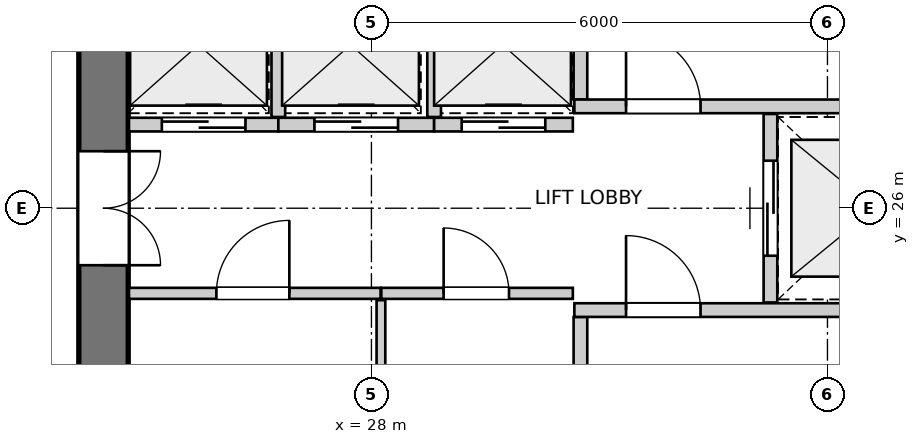
"""IFC4 building model, lengths in metres.
Left out: names, types, materials, properties, quantities, classifications, styles, units other than length and angle.
Written with IfcOpenShell. Run it as: python <this file> out.ifc"""

import sys

from ifc_helpers import new_model, si_unit, direction, frame, frame_2d, origin, place, context, subcontext, project, spatial, rectangle, extrude, source, transform, mapped, element, fill, save


model = new_model("IFC4")
c1 = context("Model", 3, precision=1e-05, world=origin(), true_north=direction((0.0, 1.0)))
c2 = subcontext(c1, "Body", "Model", "MODEL_VIEW")
j1 = project(units=[si_unit("LENGTHUNIT", "METRE"), si_unit("PLANEANGLEUNIT", "RADIAN")], contexts=[c1])
p1 = place(None, origin())
s1 = spatial("IfcSite", under=j1, at=p1, CompositionType="ELEMENT")
p2 = place(p1, origin())
s2 = spatial("IfcBuilding", under=s1, at=p2, CompositionType="ELEMENT")
p3 = place(p2, frame((0.0, 0.0, 181.0)))
s3 = spatial("IfcBuildingStorey", under=s2, at=p3, CompositionType="ELEMENT", Elevation=181.0)
p4 = place(p3, frame((24.475, 33.8, 0.0), z_axis=(0.0, 0.0, 1.0), x_axis=(0.0, -1.0, 0.0)))
e1 = element("IfcWall", 1, at=p4, inside=s3, PredefinedType="SHEAR", context=c2, shape_type="SweptSolid", body=[
    extrude(rectangle(XDim=15.6, YDim=0.65, at=frame_2d((7.8, 0.0))), origin(), (0.0, 0.0, 1.0), 2.95),
])
p5 = place(p4, frame((7.05, 0.0, 0.0)))
e2 = element("IfcOpeningElement", 2, at=p5, cuts=e1, PredefinedType="OPENING", context=c2, shape_type="SweptSolid", body=[
    extrude(rectangle(XDim=1.5, YDim=2.15, at=frame_2d((0.75, 1.075))), frame((0.0, 0.335, 0.0), z_axis=(0.0, -1.0, 0.0), x_axis=(1.0, 0.0, 0.0)), (0.0, 0.0, 1.0), 0.67),
])
p6 = place(p4, frame((3.52, 0.0, 0.0)))
e3 = element("IfcOpeningElement", 3, at=p6, cuts=e1, PredefinedType="OPENING", context=c2, shape_type="SweptSolid", body=[
    extrude(rectangle(XDim=0.86, YDim=2.05, at=frame_2d((0.43, 1.025))), frame((0.0, 0.335, 0.0), z_axis=(0.0, -1.0, 0.0), x_axis=(1.0, 0.0, 0.0)), (0.0, 0.0, 1.0), 0.67),
])
p7 = place(p4, frame((11.22, 0.0, 0.0)))
e4 = element("IfcOpeningElement", 4, at=p7, cuts=e1, PredefinedType="OPENING", context=c2, shape_type="SweptSolid", body=[
    extrude(rectangle(XDim=0.86, YDim=2.05, at=frame_2d((0.43, 1.025))), frame((0.0, 0.335, 0.0), z_axis=(0.0, -1.0, 0.0), x_axis=(1.0, 0.0, 0.0)), (0.0, 0.0, 1.0), 0.67),
])
p8 = place(p3, frame((30.75, 21.46, 0.0), z_axis=(0.0, 0.0, 1.0), x_axis=(0.0, 1.0, 0.0)))
e5 = element("IfcWall", 5, at=p8, inside=s3, PredefinedType="PARTITIONING", context=c2, shape_type="SweptSolid", body=[
    extrude(rectangle(XDim=3.11, YDim=0.18, at=frame_2d((1.555, 0.0))), origin(), (0.0, 0.0, 1.0), 2.95),
])
p9 = place(p8, frame((0.26, 0.0, 0.0)))
e6 = element("IfcOpeningElement", 6, at=p9, cuts=e5, PredefinedType="OPENING", context=c2, shape_type="SweptSolid", body=[
    extrude(rectangle(XDim=0.86, YDim=2.05, at=frame_2d((0.43, 1.025))), frame((0.0, 0.1, 0.0), z_axis=(0.0, -1.0, 0.0), x_axis=(1.0, 0.0, 0.0)), (0.0, 0.0, 1.0), 0.2),
])
p10 = place(p3, frame((30.67, 24.66, 0.0), z_axis=(0.0, 0.0, 1.0), x_axis=(1.0, 0.0, 0.0)))
e7 = element("IfcWall", 7, at=p10, inside=s3, PredefinedType="PARTITIONING", context=c2, shape_type="SweptSolid", body=[
    extrude(rectangle(XDim=5.22, YDim=0.18, at=frame_2d((2.61, 0.0))), origin(), (0.0, 0.0, 1.0), 2.95),
])
p11 = place(p10, frame((0.68, 0.0, 0.0)))
e8 = element("IfcOpeningElement", 8, at=p11, cuts=e7, PredefinedType="OPENING", context=c2, shape_type="SweptSolid", body=[
    extrude(rectangle(XDim=0.98, YDim=2.15, at=frame_2d((0.49, 1.075))), frame((0.0, 0.1, 0.0), z_axis=(0.0, -1.0, 0.0), x_axis=(1.0, 0.0, 0.0)), (0.0, 0.0, 1.0), 0.2),
])
p12 = place(p3, frame((30.75, 27.43, 0.0), z_axis=(0.0, 0.0, 1.0), x_axis=(0.0, 1.0, 0.0)))
e9 = element("IfcWall", 9, at=p12, inside=s3, PredefinedType="PARTITIONING", context=c2, shape_type="SweptSolid", body=[
    extrude(rectangle(XDim=3.11, YDim=0.18, at=frame_2d((1.555, 0.0))), origin(), (0.0, 0.0, 1.0), 2.95),
])
p13 = place(p12, frame((1.98, 0.0, 0.0)))
e10 = element("IfcOpeningElement", 10, at=p13, cuts=e9, PredefinedType="OPENING", context=c2, shape_type="SweptSolid", body=[
    extrude(rectangle(XDim=0.86, YDim=2.05, at=frame_2d((0.43, 1.025))), frame((0.0, 0.1, 0.0), z_axis=(0.0, -1.0, 0.0), x_axis=(1.0, 0.0, 0.0)), (0.0, 0.0, 1.0), 0.2),
])
p14 = place(p3, frame((30.67, 27.34, 0.0), z_axis=(0.0, 0.0, 1.0), x_axis=(1.0, 0.0, 0.0)))
e11 = element("IfcWall", 11, at=p14, inside=s3, PredefinedType="PARTITIONING", context=c2, shape_type="SweptSolid", body=[
    extrude(rectangle(XDim=5.22, YDim=0.18, at=frame_2d((2.61, 0.0))), origin(), (0.0, 0.0, 1.0), 2.95),
])
p15 = place(p14, frame((0.68, 0.0, 0.0)))
e12 = element("IfcOpeningElement", 12, at=p15, cuts=e11, PredefinedType="OPENING", context=c2, shape_type="SweptSolid", body=[
    extrude(rectangle(XDim=0.98, YDim=2.15, at=frame_2d((0.49, 1.075))), frame((0.0, 0.1, 0.0), z_axis=(0.0, -1.0, 0.0), x_axis=(1.0, 0.0, 0.0)), (0.0, 0.0, 1.0), 0.2),
])
p16 = place(p3, frame((33.25, 24.76, 0.0), z_axis=(0.0, 0.0, 1.0), x_axis=(0.0, 1.0, 0.0)))
e13 = element("IfcWall", 13, at=p16, inside=s3, PredefinedType="PARTITIONING", context=c2, shape_type="SweptSolid", body=[
    extrude(rectangle(XDim=2.48, YDim=0.18, at=frame_2d((1.24, 0.0))), origin(), (0.0, 0.0, 1.0), 2.95),
])
p17 = place(p16, frame((0.615, 0.0, 0.0)))
e14 = element("IfcOpeningElement", 14, at=p17, cuts=e13, PredefinedType="OPENING", context=c2, shape_type="SweptSolid", body=[
    extrude(rectangle(XDim=1.25, YDim=2.15, at=frame_2d((0.625, 1.075))), frame((0.0, 0.1, 0.0), z_axis=(0.0, -1.0, 0.0), x_axis=(1.0, 0.0, 0.0)), (0.0, 0.0, 1.0), 0.2),
])
p18 = place(p3, frame((24.81, 24.88, 0.0), z_axis=(0.0, 0.0, 1.0), x_axis=(1.0, 0.0, 0.0)))
e15 = element("IfcWall", 15, at=p18, inside=s3, PredefinedType="PARTITIONING", context=c2, shape_type="SweptSolid", body=[
    extrude(rectangle(XDim=3.31, YDim=0.145, at=frame_2d((1.655, 0.0))), origin(), (0.0, 0.0, 1.0), 2.95),
])
p19 = place(p18, frame((1.15, 0.0, 0.0)))
e16 = element("IfcOpeningElement", 16, at=p19, cuts=e15, PredefinedType="OPENING", context=c2, shape_type="SweptSolid", body=[
    extrude(rectangle(XDim=0.96, YDim=2.1, at=frame_2d((0.48, 1.05))), frame((0.0, 0.083, 0.0), z_axis=(0.0, -1.0, 0.0), x_axis=(1.0, 0.0, 0.0)), (0.0, 0.0, 1.0), 0.165),
])
p20 = place(p3, frame((28.13, 24.88, 0.0), z_axis=(0.0, 0.0, 1.0), x_axis=(1.0, 0.0, 0.0)))
e17 = element("IfcWall", 17, at=p20, inside=s3, PredefinedType="PARTITIONING", context=c2, shape_type="SweptSolid", body=[
    extrude(rectangle(XDim=2.52, YDim=0.145, at=frame_2d((1.26, 0.0))), origin(), (0.0, 0.0, 1.0), 2.95),
])
p21 = place(p20, frame((0.82, 0.0, 0.0)))
e18 = element("IfcOpeningElement", 18, at=p21, cuts=e17, PredefinedType="OPENING", context=c2, shape_type="SweptSolid", body=[
    extrude(rectangle(XDim=0.86, YDim=2.05, at=frame_2d((0.43, 1.025))), frame((0.0, 0.083, 0.0), z_axis=(0.0, -1.0, 0.0), x_axis=(1.0, 0.0, 0.0)), (0.0, 0.0, 1.0), 0.165),
])
p22 = place(p3, frame((28.125, 23.02, 0.0), z_axis=(0.0, 0.0, 1.0), x_axis=(0.0, 1.0, 0.0)))
e19 = element("IfcWall", 19, at=p22, inside=s3, PredefinedType="PARTITIONING", context=c2, shape_type="SweptSolid", body=[
    extrude(rectangle(XDim=1.77, YDim=0.115, at=frame_2d((0.885, 0.0))), origin(), (0.0, 0.0, 1.0), 2.95),
])
p23 = place(p3, frame((24.81, 27.1, 0.0), z_axis=(0.0, 0.0, 1.0), x_axis=(1.0, 0.0, 0.0)))
e20 = element("IfcWall", 20, at=p23, inside=s3, PredefinedType="PARTITIONING", context=c2, shape_type="SweptSolid", body=[
    extrude(rectangle(XDim=1.965, YDim=0.18, at=frame_2d((0.982, 0.0))), origin(), (0.0, 0.0, 1.0), 2.95),
])
p24 = place(p23, frame((0.433, 0.0, 0.0)))
e21 = element("IfcOpeningElement", 21, at=p24, cuts=e20, PredefinedType="OPENING", context=c2, shape_type="SweptSolid", body=[
    extrude(rectangle(XDim=1.1, YDim=2.15, at=frame_2d((0.55, 1.075))), frame((0.0, 0.1, 0.0), z_axis=(0.0, -1.0, 0.0), x_axis=(1.0, 0.0, 0.0)), (0.0, 0.0, 1.0), 0.2),
])
p25 = place(p3, frame((26.775, 27.1, 0.0), z_axis=(0.0, 0.0, 1.0), x_axis=(1.0, 0.0, 0.0)))
e22 = element("IfcWall", 22, at=p25, inside=s3, PredefinedType="PARTITIONING", context=c2, shape_type="SweptSolid", body=[
    extrude(rectangle(XDim=2.05, YDim=0.18, at=frame_2d((1.025, 0.0))), origin(), (0.0, 0.0, 1.0), 2.95),
])
p26 = place(p25, frame((0.475, 0.0, 0.0)))
e23 = element("IfcOpeningElement", 23, at=p26, cuts=e22, PredefinedType="OPENING", context=c2, shape_type="SweptSolid", body=[
    extrude(rectangle(XDim=1.1, YDim=2.15, at=frame_2d((0.55, 1.075))), frame((0.0, 0.1, 0.0), z_axis=(0.0, -1.0, 0.0), x_axis=(1.0, 0.0, 0.0)), (0.0, 0.0, 1.0), 0.2),
])
p27 = place(p3, frame((26.775, 27.2, 0.0), z_axis=(0.0, 0.0, 1.0), x_axis=(0.0, 1.0, 0.0)))
e24 = element("IfcWall", 24, at=p27, inside=s3, PredefinedType="PARTITIONING", context=c2, shape_type="SweptSolid", body=[
    extrude(rectangle(XDim=1.78, YDim=0.18, at=frame_2d((0.89, 0.0))), origin(), (0.0, 0.0, 1.0), 2.95),
])
p28 = place(p3, frame((28.825, 27.1, 0.0), z_axis=(0.0, 0.0, 1.0), x_axis=(1.0, 0.0, 0.0)))
e25 = element("IfcWall", 25, at=p28, inside=s3, PredefinedType="PARTITIONING", context=c2, shape_type="SweptSolid", body=[
    extrude(rectangle(XDim=1.825, YDim=0.18, at=frame_2d((0.913, 0.0))), origin(), (0.0, 0.0, 1.0), 2.95),
])
p29 = place(p28, frame((0.363, 0.0, 0.0)))
e26 = element("IfcOpeningElement", 26, at=p29, cuts=e25, PredefinedType="OPENING", context=c2, shape_type="SweptSolid", body=[
    extrude(rectangle(XDim=1.1, YDim=2.15, at=frame_2d((0.55, 1.075))), frame((0.0, 0.1, 0.0), z_axis=(0.0, -1.0, 0.0), x_axis=(1.0, 0.0, 0.0)), (0.0, 0.0, 1.0), 0.2),
])
p30 = place(p3, frame((28.825, 27.2, 0.0), z_axis=(0.0, 0.0, 1.0), x_axis=(0.0, 1.0, 0.0)))
e27 = element("IfcWall", 27, at=p30, inside=s3, PredefinedType="PARTITIONING", context=c2, shape_type="SweptSolid", body=[
    extrude(rectangle(XDim=1.78, YDim=0.18, at=frame_2d((0.89, 0.0))), origin(), (0.0, 0.0, 1.0), 2.95),
])
m1 = source(origin(), c2, "Body", "SweptSolid", [
    extrude(rectangle(XDim=1.5, YDim=2.15, at=frame_2d((0.75, 1.075))), frame((0.0, 0.025, 0.0), z_axis=(0.0, -1.0, 0.0), x_axis=(1.0, 0.0, 0.0)), (0.0, 0.0, 1.0), 0.05),
])
p31 = place(p5, origin())
e28 = element("IfcDoor", 28, at=p31, inside=s3, OperationType="DOUBLE_DOOR_SINGLE_SWING", PredefinedType="DOOR", context=c2, shape_type="MappedRepresentation", body=[
    mapped(m1, transform((0.0, 0.0, 0.0), x_axis=(1.0, 0.0, 0.0), y_axis=(0.0, 1.0, 0.0), z_axis=(0.0, 0.0, 1.0), scale=1.0)),
])
fill(e2, e28)
m2 = source(origin(), c2, "Body", "SweptSolid", [
    extrude(rectangle(XDim=0.98, YDim=2.15, at=frame_2d((0.49, 1.075))), frame((0.0, 0.025, 0.0), z_axis=(0.0, -1.0, 0.0), x_axis=(1.0, 0.0, 0.0)), (0.0, 0.0, 1.0), 0.05),
])
p32 = place(p11, origin())
e29 = element("IfcDoor", 29, at=p32, inside=s3, OperationType="SINGLE_SWING_LEFT", PredefinedType="DOOR", context=c2, shape_type="MappedRepresentation", body=[
    mapped(m2, transform((0.0, 0.0, 0.0), x_axis=(1.0, 0.0, 0.0), y_axis=(0.0, 1.0, 0.0), z_axis=(0.0, 0.0, 1.0), scale=1.0)),
])
fill(e8, e29)
p33 = place(p15, origin())
e30 = element("IfcDoor", 30, at=p33, inside=s3, OperationType="SINGLE_SWING_LEFT", PredefinedType="DOOR", context=c2, shape_type="MappedRepresentation", body=[
    mapped(m2, transform((0.0, 0.0, 0.0), x_axis=(1.0, 0.0, 0.0), y_axis=(0.0, 1.0, 0.0), z_axis=(0.0, 0.0, 1.0), scale=1.0)),
])
fill(e12, e30)
m3 = source(origin(), c2, "Body", "SweptSolid", [
    extrude(rectangle(XDim=1.25, YDim=2.15, at=frame_2d((0.625, 1.075))), frame((0.0, 0.025, 0.0), z_axis=(0.0, -1.0, 0.0), x_axis=(1.0, 0.0, 0.0)), (0.0, 0.0, 1.0), 0.05),
])
p34 = place(p17, origin())
e31 = element("IfcDoor", 31, at=p34, inside=s3, OperationType="DOUBLE_DOOR_SLIDING", PredefinedType="DOOR", context=c2, shape_type="MappedRepresentation", body=[
    mapped(m3, transform((0.0, 0.0, 0.0), x_axis=(1.0, 0.0, 0.0), y_axis=(0.0, 1.0, 0.0), z_axis=(0.0, 0.0, 1.0), scale=1.0)),
])
fill(e14, e31)
m4 = source(origin(), c2, "Body", "SweptSolid", [
    extrude(rectangle(XDim=0.96, YDim=2.1, at=frame_2d((0.48, 1.05))), frame((0.0, 0.025, 0.0), z_axis=(0.0, -1.0, 0.0), x_axis=(1.0, 0.0, 0.0)), (0.0, 0.0, 1.0), 0.05),
])
p35 = place(p19, origin())
e32 = element("IfcDoor", 32, at=p35, inside=s3, OperationType="SINGLE_SWING_RIGHT", PredefinedType="DOOR", context=c2, shape_type="MappedRepresentation", body=[
    mapped(m4, transform((0.0, 0.0, 0.0), x_axis=(1.0, 0.0, 0.0), y_axis=(0.0, 1.0, 0.0), z_axis=(0.0, 0.0, 1.0), scale=1.0)),
])
fill(e16, e32)
m5 = source(origin(), c2, "Body", "SweptSolid", [
    extrude(rectangle(XDim=0.86, YDim=2.05, at=frame_2d((0.43, 1.025))), frame((0.0, 0.025, 0.0), z_axis=(0.0, -1.0, 0.0), x_axis=(1.0, 0.0, 0.0)), (0.0, 0.0, 1.0), 0.05),
])
p36 = place(p21, origin())
e33 = element("IfcDoor", 33, at=p36, inside=s3, OperationType="SINGLE_SWING_LEFT", PredefinedType="DOOR", context=c2, shape_type="MappedRepresentation", body=[
    mapped(m5, transform((0.0, 0.0, 0.0), x_axis=(1.0, 0.0, 0.0), y_axis=(0.0, 1.0, 0.0), z_axis=(0.0, 0.0, 1.0), scale=1.0)),
])
fill(e18, e33)
m6 = source(origin(), c2, "Body", "SweptSolid", [
    extrude(rectangle(XDim=1.1, YDim=2.15, at=frame_2d((0.55, 1.075))), frame((0.0, 0.025, 0.0), z_axis=(0.0, -1.0, 0.0), x_axis=(1.0, 0.0, 0.0)), (0.0, 0.0, 1.0), 0.05),
])
p37 = place(p24, origin())
e34 = element("IfcDoor", 34, at=p37, inside=s3, OperationType="DOUBLE_DOOR_SLIDING", PredefinedType="DOOR", context=c2, shape_type="MappedRepresentation", body=[
    mapped(m6, transform((0.0, 0.0, 0.0), x_axis=(1.0, 0.0, 0.0), y_axis=(0.0, 1.0, 0.0), z_axis=(0.0, 0.0, 1.0), scale=1.0)),
])
fill(e21, e34)
p38 = place(p26, origin())
e35 = element("IfcDoor", 35, at=p38, inside=s3, OperationType="DOUBLE_DOOR_SLIDING", PredefinedType="DOOR", context=c2, shape_type="MappedRepresentation", body=[
    mapped(m6, transform((0.0, 0.0, 0.0), x_axis=(1.0, 0.0, 0.0), y_axis=(0.0, 1.0, 0.0), z_axis=(0.0, 0.0, 1.0), scale=1.0)),
])
fill(e23, e35)
p39 = place(p29, origin())
e36 = element("IfcDoor", 36, at=p39, inside=s3, OperationType="DOUBLE_DOOR_SLIDING", PredefinedType="DOOR", context=c2, shape_type="MappedRepresentation", body=[
    mapped(m6, transform((0.0, 0.0, 0.0), x_axis=(1.0, 0.0, 0.0), y_axis=(0.0, 1.0, 0.0), z_axis=(0.0, 0.0, 1.0), scale=1.0)),
])
fill(e26, e36)
save(model, sys.argv[1])
